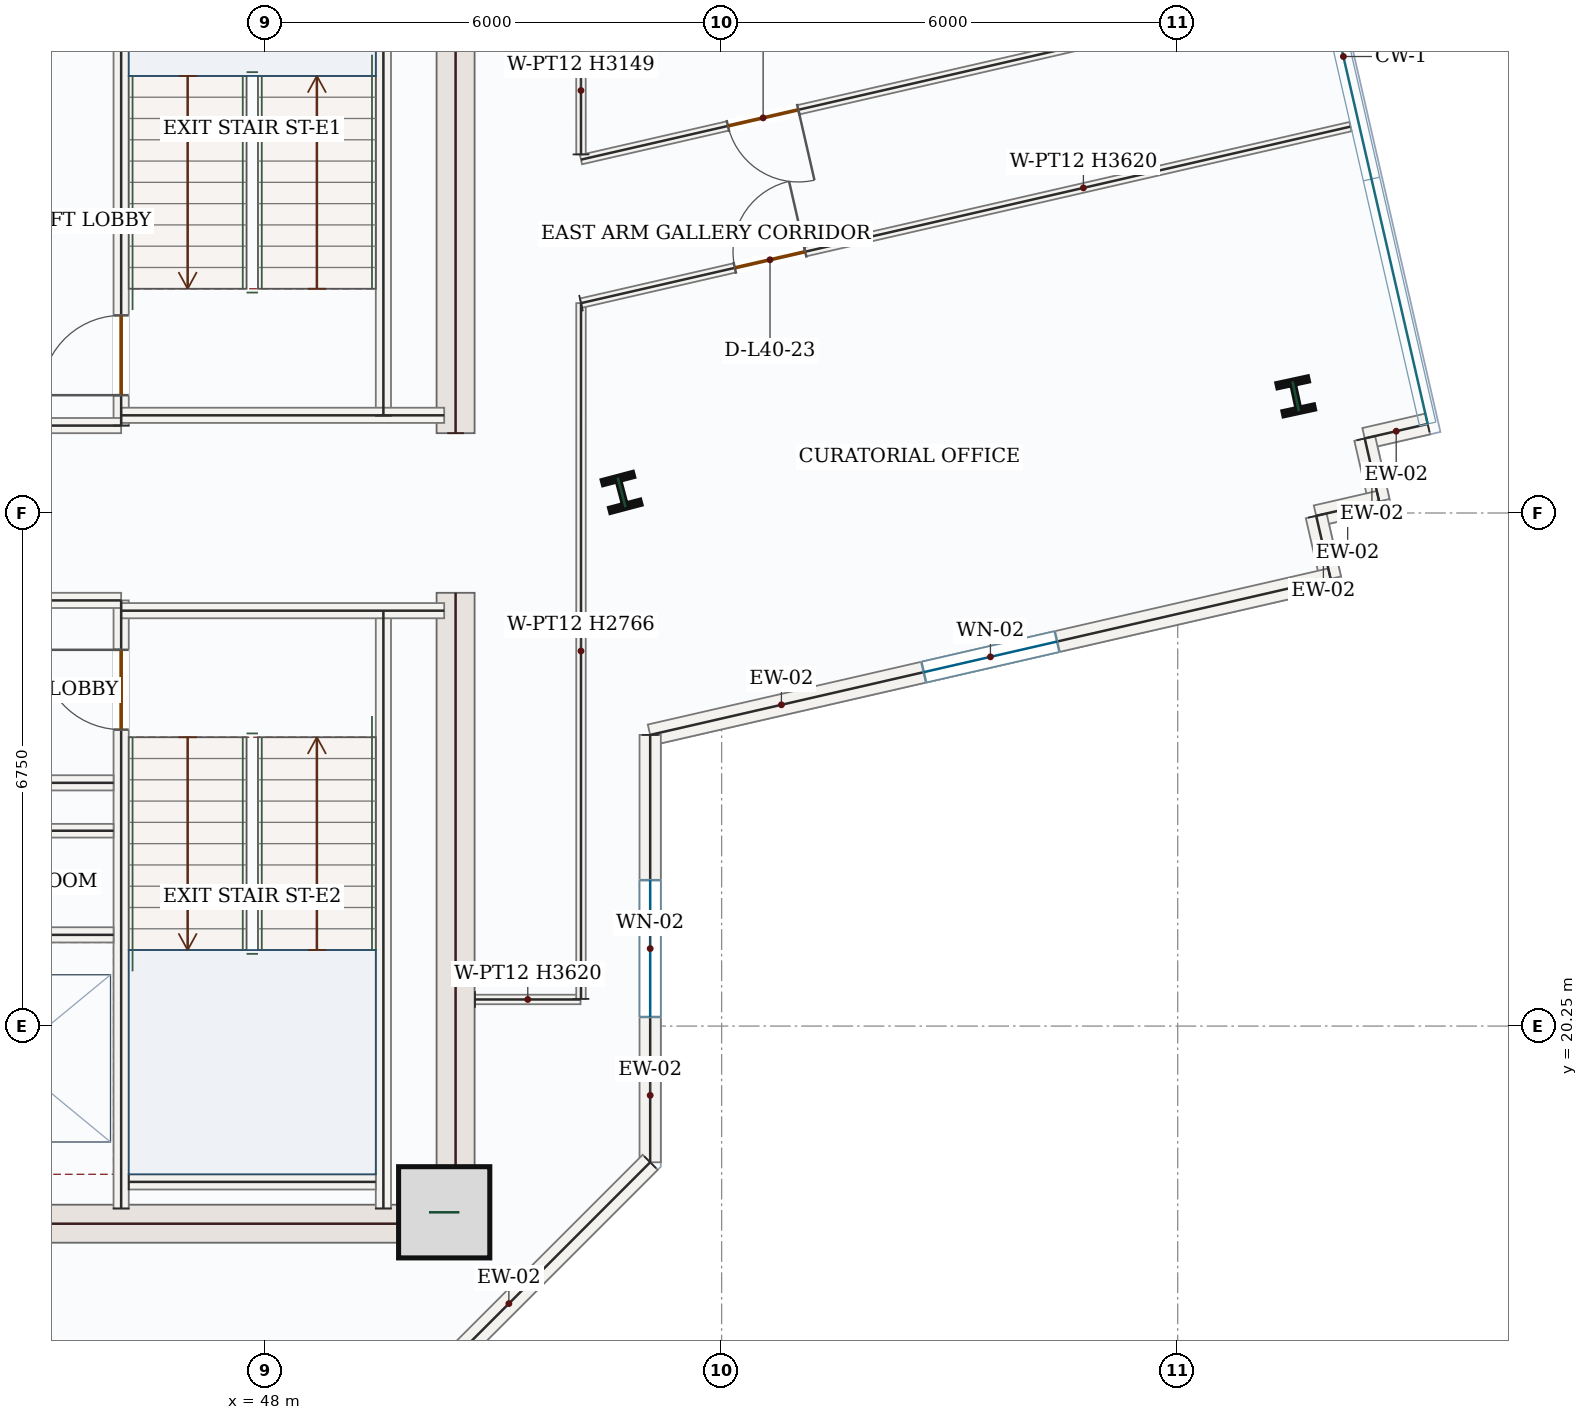
"""IFC4 building model, lengths in metres.
Left out: names, types, materials, properties, quantities, classifications, styles, units other than length and angle.
Written with IfcOpenShell. Run it as: python <this file> out.ifc"""

import sys

from ifc_helpers import new_model, si_unit, direction, frame, frame_2d, origin, origin_2d, place, context, subcontext, project, spatial, rectangle, i_section, extrude, source, transform, mapped, element, fill, save


model = new_model("IFC4")
c1 = context("Model", 3, precision=1e-05, world=origin(), true_north=direction((0.0, 1.0)))
c2 = subcontext(c1, "Body", "Model", "MODEL_VIEW")
j1 = project(units=[si_unit("LENGTHUNIT", "METRE"), si_unit("PLANEANGLEUNIT", "RADIAN")], contexts=[c1])
p1 = place(None, origin())
s1 = spatial("IfcSite", under=j1, at=p1, CompositionType="ELEMENT")
p2 = place(p1, origin())
s2 = spatial("IfcBuilding", under=s1, at=p2, CompositionType="ELEMENT")
p3 = place(p2, frame((0.0, 0.0, 174.6)))
s3 = spatial("IfcBuildingStorey", under=s2, at=p3, CompositionType="ELEMENT", Elevation=174.6)
m1 = source(origin(), c2, "Body", "SweptSolid", [
    extrude(rectangle(XDim=8.55, YDim=0.5, at=frame_2d((4.275, 0.0))), origin(), (0.0, 0.0, 1.0), 3.62),
])
for number, where, z_axis, x_axis in (
    (1, (50.5, 17.4, 0.0), (0.0, 0.0, 1.0), (0.0, 1.0, 0.0)),
    (2, (50.5, 28.05, 0.0), (0.0, 0.0, 1.0), (0.0, 1.0, 0.0)),
):
    element("IfcWall", number, at=place(p3, frame(where, z_axis=z_axis, x_axis=x_axis)), inside=s3, PredefinedType="SHEAR", context=c2, shape_type="MappedRepresentation", body=[
        mapped(m1, transform((0.0, 0.0, 0.0), x_axis=(1.0, 0.0, 0.0), y_axis=(0.0, 1.0, 0.0), z_axis=(0.0, 0.0, 1.0), scale=1.0)),
    ])
m2 = source(origin(), c2, "Body", "SweptSolid", [
    extrude(rectangle(XDim=7.0, YDim=0.5, at=frame_2d((3.5, 0.0))), origin(), (0.0, 0.0, 1.0), 3.62),
])
p4 = place(p3, frame((43.25, 17.65, 0.0), z_axis=(0.0, 0.0, 1.0), x_axis=(1.0, 0.0, 0.0)))
e3 = element("IfcWall", 3, at=p4, inside=s3, PredefinedType="SHEAR", context=c2, shape_type="MappedRepresentation", body=[
    mapped(m2, transform((0.0, 0.0, 0.0), x_axis=(1.0, 0.0, 0.0), y_axis=(0.0, 1.0, 0.0), z_axis=(0.0, 0.0, 1.0), scale=1.0)),
])
m3 = source(origin(), c2, "Body", "SweptSolid", [
    extrude(rectangle(XDim=1.2, YDim=1.2, at=origin_2d()), origin(), (0.0, 0.0, 1.0), 3.9),
])
p5 = place(p3, frame((50.35, 17.8, 0.0), z_axis=(0.0, 0.0, 1.0), x_axis=(1.0, 0.0, 0.0)))
e4 = element("IfcColumn", 4, at=p5, inside=s3, PredefinedType="COLUMN", context=c2, shape_type="MappedRepresentation", body=[
    mapped(m3, transform((0.0, 0.0, 0.0), x_axis=(1.0, 0.0, 0.0), y_axis=(0.0, 1.0, 0.0), z_axis=(0.0, 0.0, 1.0), scale=1.0)),
])
m4 = source(origin(), c2, "Body", "SweptSolid", [
    extrude(i_section(OverallWidth=0.412, OverallDepth=0.435, WebThickness=0.036, FlangeThickness=0.057, FilletRadius=0.018, at=origin_2d()), origin(), (0.0, 0.0, 1.0), 3.9),
])
for number, where, z_axis, x_axis in (
    (5, (52.684, 27.271, 0.0), (0.0, 0.0, 1.0), (0.967, 0.255, 0.0)),
    (6, (61.553, 28.535, 0.0), (0.0, 0.0, 1.0), (0.977, 0.211, 0.0)),
):
    element("IfcColumn", number, at=place(p3, frame(where, z_axis=z_axis, x_axis=x_axis)), inside=s3, PredefinedType="COLUMN", context=c2, shape_type="MappedRepresentation", body=[
        mapped(m4, transform((0.0, 0.0, 0.0), x_axis=(1.0, 0.0, 0.0), y_axis=(0.0, 1.0, 0.0), z_axis=(0.0, 0.0, 1.0), scale=1.0)),
    ])
m5 = source(origin(), c2, "Body", "SweptSolid", [
    extrude(rectangle(XDim=0.85, YDim=0.28, at=frame_2d((0.425, 0.0))), origin(), (0.0, 0.0, 1.0), 3.62),
])
p6 = place(p3, frame((63.289, 28.171, 0.0), z_axis=(0.0, 0.0, 1.0), x_axis=(-0.974704946586, -0.223495563939, 0.0)))
e7 = element("IfcWall", 7, at=p6, inside=s3, PredefinedType="SOLIDWALL", context=c2, shape_type="MappedRepresentation", body=[
    mapped(m5, transform((0.0, 0.0, 0.0), x_axis=(1.0, 0.0, 0.0), y_axis=(0.0, 1.0, 0.0), z_axis=(0.0, 0.0, 1.0), scale=1.0)),
])
m6 = source(origin(), c2, "Body", "SweptSolid", [
    extrude(rectangle(XDim=0.85, YDim=0.28, at=frame_2d((0.425, 0.0))), origin(), (0.0, 0.0, 1.0), 3.62),
])
p7 = place(p3, frame((62.461, 27.981, 0.0), z_axis=(0.0, 0.0, 1.0), x_axis=(0.22316012353, -0.974781800849, 0.0)))
e8 = element("IfcWall", 8, at=p7, inside=s3, PredefinedType="SOLIDWALL", context=c2, shape_type="MappedRepresentation", body=[
    mapped(m6, transform((0.0, 0.0, 0.0), x_axis=(1.0, 0.0, 0.0), y_axis=(0.0, 1.0, 0.0), z_axis=(0.0, 0.0, 1.0), scale=1.0)),
])
for number, where, z_axis, x_axis in (
    (9, (62.65, 27.153, 0.0), (0.0, 0.0, 1.0), (-0.975, -0.223, 0.0)),
    (10, (61.822, 26.963, 0.0), (0.0, 0.0, 1.0), (0.224, -0.975, 0.0)),
):
    element("IfcWall", number, at=place(p3, frame(where, z_axis=z_axis, x_axis=x_axis)), inside=s3, PredefinedType="SOLIDWALL", context=c2, shape_type="MappedRepresentation", body=[
        mapped(m5, transform((0.0, 0.0, 0.0), x_axis=(1.0, 0.0, 0.0), y_axis=(0.0, 1.0, 0.0), z_axis=(0.0, 0.0, 1.0), scale=1.0)),
    ])
p8 = place(p3, frame((62.012, 26.134, 0.0), z_axis=(0.0, 0.0, 1.0), x_axis=(-0.974680686557, -0.223601340005, 0.0)))
e11 = element("IfcWall", 11, at=p8, inside=s3, PredefinedType="SOLIDWALL", context=c2, shape_type="SweptSolid", body=[
    extrude(rectangle(XDim=9.185, YDim=0.28, at=frame_2d((4.592, 0.0))), origin(), (0.0, 0.0, 1.0), 3.62),
])
p9 = place(p8, frame((3.692, 0.0, 0.85)))
e12 = element("IfcOpeningElement", 12, at=p9, cuts=e11, PredefinedType="OPENING", context=c2, shape_type="SweptSolid", body=[
    extrude(rectangle(XDim=1.8, YDim=1.75, at=frame_2d((0.9, 0.875))), frame((0.0, 0.15, 0.0), z_axis=(0.0, -1.0, 0.0), x_axis=(1.0, 0.0, 0.0)), (0.0, 0.0, 1.0), 0.3),
])
p10 = place(p3, frame((53.06, 24.081, 0.0), z_axis=(0.0, 0.0, 1.0), x_axis=(0.0, -1.0, 0.0)))
e13 = element("IfcWall", 13, at=p10, inside=s3, PredefinedType="SOLIDWALL", context=c2, shape_type="SweptSolid", body=[
    extrude(rectangle(XDim=5.623, YDim=0.28, at=frame_2d((2.811, 0.0))), origin(), (0.0, 0.0, 1.0), 3.62),
])
p11 = place(p10, frame((1.911, 0.0, 0.85)))
e14 = element("IfcOpeningElement", 14, at=p11, cuts=e13, PredefinedType="OPENING", context=c2, shape_type="SweptSolid", body=[
    extrude(rectangle(XDim=1.8, YDim=1.75, at=frame_2d((0.9, 0.875))), frame((0.0, 0.15, 0.0), z_axis=(0.0, -1.0, 0.0), x_axis=(1.0, 0.0, 0.0)), (0.0, 0.0, 1.0), 0.3),
])
m7 = source(origin(), c2, "Body", "SweptSolid", [
    extrude(rectangle(XDim=5.258, YDim=0.28, at=frame_2d((2.629, 0.0))), origin(), (0.0, 0.0, 1.0), 3.62),
])
p12 = place(p3, frame((53.06, 18.458, 0.0), z_axis=(0.0, 0.0, 1.0), x_axis=(-0.707106781187, -0.707106781187, 0.0)))
e15 = element("IfcWall", 15, at=p12, inside=s3, PredefinedType="SOLIDWALL", context=c2, shape_type="MappedRepresentation", body=[
    mapped(m7, transform((0.0, 0.0, 0.0), x_axis=(1.0, 0.0, 0.0), y_axis=(0.0, 1.0, 0.0), z_axis=(0.0, 0.0, 1.0), scale=1.0)),
])
m8 = source(origin(), c2, "Body", "SweptSolid", [
    extrude(rectangle(XDim=7.87, YDim=0.2, at=frame_2d((3.935, 0.0))), origin(), (0.0, 0.0, 1.0), 3.62),
])
for number, where, z_axis, x_axis in (
    (16, (49.55, 17.85, 0.0), (0.0, 0.0, 1.0), (0.0, 1.0, 0.0)),
    (17, (49.55, 28.28, 0.0), (0.0, 0.0, 1.0), (0.0, 1.0, 0.0)),
):
    element("IfcWall", number, at=place(p3, frame(where, z_axis=z_axis, x_axis=x_axis)), inside=s3, PredefinedType="SOLIDWALL", context=c2, shape_type="MappedRepresentation", body=[
        mapped(m8, transform((0.0, 0.0, 0.0), x_axis=(1.0, 0.0, 0.0), y_axis=(0.0, 1.0, 0.0), z_axis=(0.0, 0.0, 1.0), scale=1.0)),
    ])
p13 = place(p3, frame((46.1, 17.85, 0.0), z_axis=(0.0, 0.0, 1.0), x_axis=(0.0, 1.0, 0.0)))
e18 = element("IfcWall", 18, at=p13, inside=s3, PredefinedType="SOLIDWALL", context=c2, shape_type="SweptSolid", body=[
    extrude(rectangle(XDim=8.0, YDim=0.2, at=frame_2d((4.0, 0.0))), origin(), (0.0, 0.0, 1.0), 3.62),
])
p14 = place(p13, frame((6.3, 0.0, 0.0)))
e19 = element("IfcOpeningElement", 19, at=p14, cuts=e18, PredefinedType="OPENING", context=c2, shape_type="SweptSolid", body=[
    extrude(rectangle(XDim=1.05, YDim=2.15, at=frame_2d((0.525, 1.075))), frame((0.0, 0.11, 0.0), z_axis=(0.0, -1.0, 0.0), x_axis=(1.0, 0.0, 0.0)), (0.0, 0.0, 1.0), 0.22),
])
p15 = place(p3, frame((46.1, 28.15, 0.0), z_axis=(0.0, 0.0, 1.0), x_axis=(0.0, 1.0, 0.0)))
e20 = element("IfcWall", 20, at=p15, inside=s3, PredefinedType="SOLIDWALL", context=c2, shape_type="SweptSolid", body=[
    extrude(rectangle(XDim=8.0, YDim=0.2, at=frame_2d((4.0, 0.0))), origin(), (0.0, 0.0, 1.0), 3.62),
])
p16 = place(p15, frame((0.4, 0.0, 0.0)))
e21 = element("IfcOpeningElement", 21, at=p16, cuts=e20, PredefinedType="OPENING", context=c2, shape_type="SweptSolid", body=[
    extrude(rectangle(XDim=1.05, YDim=2.15, at=frame_2d((0.525, 1.075))), frame((0.0, 0.11, 0.0), z_axis=(0.0, -1.0, 0.0), x_axis=(1.0, 0.0, 0.0)), (0.0, 0.0, 1.0), 0.22),
])
m9 = source(origin(), c2, "Body", "SweptSolid", [
    extrude(rectangle(XDim=3.0, YDim=0.2, at=frame_2d((1.5, 0.0))), origin(), (0.0, 0.0, 1.0), 3.62),
])
p17 = place(p3, frame((43.1, 25.85, 0.0), z_axis=(0.0, 0.0, 1.0), x_axis=(1.0, 0.0, 0.0)))
e22 = element("IfcWall", 22, at=p17, inside=s3, PredefinedType="SOLIDWALL", context=c2, shape_type="MappedRepresentation", body=[
    mapped(m9, transform((0.0, 0.0, 0.0), x_axis=(1.0, 0.0, 0.0), y_axis=(0.0, 1.0, 0.0), z_axis=(0.0, 0.0, 1.0), scale=1.0)),
])
m10 = source(origin(), c2, "Body", "SweptSolid", [
    extrude(rectangle(XDim=4.25, YDim=0.2, at=frame_2d((2.125, 0.0))), origin(), (0.0, 0.0, 1.0), 3.62),
])
p18 = place(p3, frame((46.1, 25.715, 0.0), z_axis=(0.0, 0.0, 1.0), x_axis=(1.0, 0.0, 0.0)))
e23 = element("IfcWall", 23, at=p18, inside=s3, PredefinedType="SOLIDWALL", context=c2, shape_type="MappedRepresentation", body=[
    mapped(m10, transform((0.0, 0.0, 0.0), x_axis=(1.0, 0.0, 0.0), y_axis=(0.0, 1.0, 0.0), z_axis=(0.0, 0.0, 1.0), scale=1.0)),
])
p19 = place(p3, frame((43.1, 28.15, 0.0), z_axis=(0.0, 0.0, 1.0), x_axis=(1.0, 0.0, 0.0)))
e24 = element("IfcWall", 24, at=p19, inside=s3, PredefinedType="SOLIDWALL", context=c2, shape_type="MappedRepresentation", body=[
    mapped(m9, transform((0.0, 0.0, 0.0), x_axis=(1.0, 0.0, 0.0), y_axis=(0.0, 1.0, 0.0), z_axis=(0.0, 0.0, 1.0), scale=1.0)),
])
p20 = place(p3, frame((46.1, 28.285, 0.0), z_axis=(0.0, 0.0, 1.0), x_axis=(1.0, 0.0, 0.0)))
e25 = element("IfcWall", 25, at=p20, inside=s3, PredefinedType="SOLIDWALL", context=c2, shape_type="MappedRepresentation", body=[
    mapped(m10, transform((0.0, 0.0, 0.0), x_axis=(1.0, 0.0, 0.0), y_axis=(0.0, 1.0, 0.0), z_axis=(0.0, 0.0, 1.0), scale=1.0)),
])
m11 = source(origin(), c2, "Body", "SweptSolid", [
    extrude(rectangle(XDim=3.25, YDim=0.2, at=frame_2d((1.625, 0.0))), origin(), (0.0, 0.0, 1.0), 3.62),
])
p21 = place(p3, frame((46.2, 18.2, 0.0), z_axis=(0.0, 0.0, 1.0), x_axis=(1.0, 0.0, 0.0)))
e26 = element("IfcWall", 26, at=p21, inside=s3, PredefinedType="SOLIDWALL", context=c2, shape_type="MappedRepresentation", body=[
    mapped(m11, transform((0.0, 0.0, 0.0), x_axis=(1.0, 0.0, 0.0), y_axis=(0.0, 1.0, 0.0), z_axis=(0.0, 0.0, 1.0), scale=1.0)),
])
m12 = source(origin(), c2, "Body", "SweptSolid", [
    extrude(rectangle(XDim=2.75, YDim=0.2, at=frame_2d((1.375, 0.0))), origin(), (0.0, 0.0, 1.0), 3.62),
])
for number, where, z_axis, x_axis in (
    (27, (43.25, 23.45, 0.0), (0.0, 0.0, 1.0), (1.0, 0.0, 0.0)),
    (28, (43.25, 21.45, 0.0), (0.0, 0.0, 1.0), (1.0, 0.0, 0.0)),
):
    element("IfcWall", number, at=place(p3, frame(where, z_axis=z_axis, x_axis=x_axis)), inside=s3, PredefinedType="SOLIDWALL", context=c2, shape_type="MappedRepresentation", body=[
        mapped(m12, transform((0.0, 0.0, 0.0), x_axis=(1.0, 0.0, 0.0), y_axis=(0.0, 1.0, 0.0), z_axis=(0.0, 0.0, 1.0), scale=1.0)),
    ])
m13 = source(origin(), c2, "Body", "SweptSolid", [
    extrude(rectangle(XDim=2.75, YDim=0.18, at=frame_2d((1.375, 0.0))), origin(), (0.0, 0.0, 1.0), 3.62),
])
p22 = place(p3, frame((43.25, 22.82, 0.0), z_axis=(0.0, 0.0, 1.0), x_axis=(1.0, 0.0, 0.0)))
e29 = element("IfcWall", 29, at=p22, inside=s3, PredefinedType="PARTITIONING", context=c2, shape_type="MappedRepresentation", body=[
    mapped(m13, transform((0.0, 0.0, 0.0), x_axis=(1.0, 0.0, 0.0), y_axis=(0.0, 1.0, 0.0), z_axis=(0.0, 0.0, 1.0), scale=1.0)),
])
m14 = source(origin(), c2, "Body", "SweptSolid", [
    extrude(rectangle(XDim=1.389, YDim=0.125, at=frame_2d((0.695, 0.0))), origin(), (0.0, 0.0, 1.0), 3.62),
])
p23 = place(p3, frame((50.755, 20.6, 0.0), z_axis=(0.0, 0.0, 1.0), x_axis=(1.0, 0.0, 0.0)))
e30 = element("IfcWall", 30, at=p23, inside=s3, PredefinedType="PARTITIONING", context=c2, shape_type="MappedRepresentation", body=[
    mapped(m14, transform((0.0, 0.0, 0.0), x_axis=(1.0, 0.0, 0.0), y_axis=(0.0, 1.0, 0.0), z_axis=(0.0, 0.0, 1.0), scale=1.0)),
])
m15 = source(origin(), c2, "Body", "SweptSolid", [
    extrude(rectangle(XDim=9.153, YDim=0.125, at=frame_2d((4.577, 0.0))), origin(), (0.0, 0.0, 1.0), 2.766),
])
p24 = place(p3, frame((52.15, 20.608, 0.0), z_axis=(0.0, 0.0, 1.0), x_axis=(2.6672357e-05, 0.999999999644, 0.0)))
e31 = element("IfcWall", 31, at=p24, inside=s3, PredefinedType="PARTITIONING", context=c2, shape_type="MappedRepresentation", body=[
    mapped(m15, transform((0.0, 0.0, 0.0), x_axis=(1.0, 0.0, 0.0), y_axis=(0.0, 1.0, 0.0), z_axis=(0.0, 0.0, 1.0), scale=1.0)),
])
p25 = place(p3, frame((52.15, 29.761, 0.0), z_axis=(0.0, 0.0, 1.0), x_axis=(0.974685490502, 0.223580398525, 0.0)))
e32 = element("IfcWall", 32, at=p25, inside=s3, PredefinedType="PARTITIONING", context=c2, shape_type="SweptSolid", body=[
    extrude(rectangle(XDim=10.387, YDim=0.125, at=frame_2d((5.193, 0.0))), origin(), (0.0, 0.0, 1.0), 3.62),
])
p26 = place(p25, frame((2.076, 0.0, 0.0)))
e33 = element("IfcOpeningElement", 33, at=p26, cuts=e32, PredefinedType="OPENING", context=c2, shape_type="SweptSolid", body=[
    extrude(rectangle(XDim=0.95, YDim=2.15, at=frame_2d((0.475, 1.075))), frame((0.0, 0.073, 0.0), z_axis=(0.0, -1.0, 0.0), x_axis=(1.0, 0.0, 0.0)), (0.0, 0.0, 1.0), 0.145),
])
p27 = place(p3, frame((61.862, 33.877, 0.0), z_axis=(0.0, 0.0, 1.0), x_axis=(-0.974682727551, -0.223592443106, 0.0)))
e34 = element("IfcWall", 34, at=p27, inside=s3, PredefinedType="PARTITIONING", context=c2, shape_type="SweptSolid", body=[
    extrude(rectangle(XDim=9.965, YDim=0.125, at=frame_2d((4.982, 0.0))), origin(), (0.0, 0.0, 1.0), 3.62),
])
p28 = place(p27, frame((7.031, 0.0, 0.0)))
e35 = element("IfcOpeningElement", 35, at=p28, cuts=e34, PredefinedType="OPENING", context=c2, shape_type="SweptSolid", body=[
    extrude(rectangle(XDim=0.95, YDim=2.15, at=frame_2d((0.475, 1.075))), frame((0.0, 0.073, 0.0), z_axis=(0.0, -1.0, 0.0), x_axis=(1.0, 0.0, 0.0)), (0.0, 0.0, 1.0), 0.145),
])
m16 = source(origin(), c2, "Body", "SweptSolid", [
    extrude(rectangle(XDim=1.681, YDim=0.125, at=frame_2d((0.84, 0.0))), origin(), (0.0, 0.0, 1.0), 3.149),
])
p29 = place(p3, frame((52.15, 31.718, 0.0), z_axis=(0.0, 0.0, 1.0), x_axis=(-0.000580973032, 0.999999831235, 0.0)))
e36 = element("IfcWall", 36, at=p29, inside=s3, PredefinedType="PARTITIONING", context=c2, shape_type="MappedRepresentation", body=[
    mapped(m16, transform((0.0, 0.0, 0.0), x_axis=(1.0, 0.0, 0.0), y_axis=(0.0, 1.0, 0.0), z_axis=(0.0, 0.0, 1.0), scale=1.0)),
])
m17 = source(origin(), c2, "Body", "SweptSolid", [
    extrude(rectangle(XDim=1.8, YDim=1.75, at=frame_2d((0.9, 0.875))), frame((0.0, 0.03, 0.0), z_axis=(0.0, -1.0, 0.0), x_axis=(1.0, 0.0, 0.0)), (0.0, 0.0, 1.0), 0.06),
])
p30 = place(p9, origin())
e37 = element("IfcWindow", 37, at=p30, inside=s3, PartitioningType="DOUBLE_PANEL_VERTICAL", PredefinedType="WINDOW", context=c2, shape_type="MappedRepresentation", body=[
    mapped(m17, transform((0.0, 0.0, 0.0), x_axis=(1.0, 0.0, 0.0), y_axis=(0.0, 1.0, 0.0), z_axis=(0.0, 0.0, 1.0), scale=1.0)),
])
fill(e12, e37)
p31 = place(p11, origin())
e38 = element("IfcWindow", 38, at=p31, inside=s3, PartitioningType="DOUBLE_PANEL_VERTICAL", PredefinedType="WINDOW", context=c2, shape_type="MappedRepresentation", body=[
    mapped(m17, transform((0.0, 0.0, 0.0), x_axis=(1.0, 0.0, 0.0), y_axis=(0.0, 1.0, 0.0), z_axis=(0.0, 0.0, 1.0), scale=1.0)),
])
fill(e14, e38)
m18 = source(origin(), c2, "Body", "SweptSolid", [
    extrude(rectangle(XDim=1.05, YDim=2.15, at=frame_2d((0.525, 1.075))), frame((0.0, 0.025, 0.0), z_axis=(0.0, -1.0, 0.0), x_axis=(1.0, 0.0, 0.0)), (0.0, 0.0, 1.0), 0.05),
])
p32 = place(p16, origin())
e39 = element("IfcDoor", 39, at=p32, inside=s3, OperationType="SINGLE_SWING_LEFT", PredefinedType="DOOR", context=c2, shape_type="MappedRepresentation", body=[
    mapped(m18, transform((0.0, 0.0, 0.0), x_axis=(1.0, 0.0, 0.0), y_axis=(0.0, 1.0, 0.0), z_axis=(0.0, 0.0, 1.0), scale=1.0)),
])
fill(e21, e39)
p33 = place(p14, origin())
e40 = element("IfcDoor", 40, at=p33, inside=s3, OperationType="SINGLE_SWING_RIGHT", PredefinedType="DOOR", context=c2, shape_type="MappedRepresentation", body=[
    mapped(m18, transform((0.0, 0.0, 0.0), x_axis=(1.0, 0.0, 0.0), y_axis=(0.0, 1.0, 0.0), z_axis=(0.0, 0.0, 1.0), scale=1.0)),
])
fill(e19, e40)
m19 = source(origin(), c2, "Body", "SweptSolid", [
    extrude(rectangle(XDim=0.95, YDim=2.15, at=frame_2d((0.475, 1.075))), frame((0.0, 0.025, 0.0), z_axis=(0.0, -1.0, 0.0), x_axis=(1.0, 0.0, 0.0)), (0.0, 0.0, 1.0), 0.05),
])
p34 = place(p26, origin())
e41 = element("IfcDoor", 41, at=p34, inside=s3, OperationType="SINGLE_SWING_RIGHT", PredefinedType="DOOR", context=c2, shape_type="MappedRepresentation", body=[
    mapped(m19, transform((0.0, 0.0, 0.0), x_axis=(1.0, 0.0, 0.0), y_axis=(0.0, 1.0, 0.0), z_axis=(0.0, 0.0, 1.0), scale=1.0)),
])
fill(e33, e41)
p35 = place(p28, origin())
e42 = element("IfcDoor", 42, at=p35, inside=s3, OperationType="SINGLE_SWING_LEFT", PredefinedType="DOOR", context=c2, shape_type="MappedRepresentation", body=[
    mapped(m19, transform((0.0, 0.0, 0.0), x_axis=(1.0, 0.0, 0.0), y_axis=(0.0, 1.0, 0.0), z_axis=(0.0, 0.0, 1.0), scale=1.0)),
])
fill(e35, e42)
save(model, sys.argv[1])
